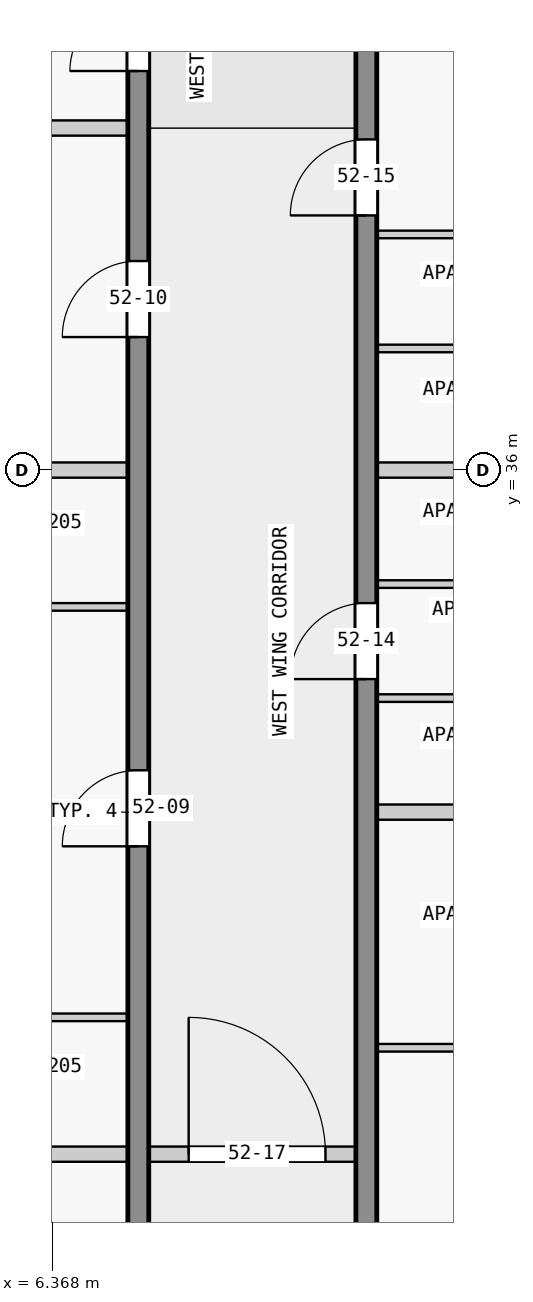
"""IFC4 building model, lengths in metres.
Left out: names, types, materials, properties, quantities, classifications, styles, units other than length and angle.
Written with IfcOpenShell. Run it as: python <this file> out.ifc"""

import sys

from ifc_helpers import new_model, si_unit, direction, frame, frame_2d, origin, place, context, subcontext, project, spatial, rectangle, extrude, element, fill, save


model = new_model("IFC4")
c1 = context("Model", 3, precision=1e-05, world=origin(), true_north=direction((0.0, 1.0)))
c2 = subcontext(c1, "Body", "Model", "MODEL_VIEW")
j1 = project(units=[si_unit("LENGTHUNIT", "METRE"), si_unit("PLANEANGLEUNIT", "RADIAN")], contexts=[c1])
p1 = place(None, origin())
s1 = spatial("IfcSite", under=j1, at=p1, CompositionType="ELEMENT")
p2 = place(p1, origin())
s2 = spatial("IfcBuilding", under=s1, at=p2, CompositionType="ELEMENT")
p3 = place(p2, frame((0.0, 0.0, 201.4)))
s3 = spatial("IfcBuildingStorey", under=s2, at=p3, CompositionType="ELEMENT", Elevation=201.4)
p4 = place(p3, frame((7.5, 18.0, 0.0), z_axis=(0.0, 0.0, 1.0), x_axis=(0.0, 1.0, 0.0)))
e1 = element("IfcWall", 1, at=p4, inside=s3, PredefinedType="SHEAR", context=c2, shape_type="SweptSolid", body=[
    extrude(rectangle(XDim=27.0, YDim=0.275, at=frame_2d((13.5, 0.0))), origin(), (0.0, 0.0, 1.0), 3.25),
])
p5 = place(p4, frame((1.75, 0.0, 0.0)))
e2 = element("IfcOpeningElement", 2, at=p5, cuts=e1, PredefinedType="OPENING", context=c2, shape_type="SweptSolid", body=[
    extrude(rectangle(XDim=1.0, YDim=2.1, at=frame_2d((0.5, 1.05))), frame((0.0, 0.147, 0.0), z_axis=(0.0, -1.0, 0.0), x_axis=(1.0, 0.0, 0.0)), (0.0, 0.0, 1.0), 0.295),
])
p6 = place(p4, frame((5.85, 0.0, 0.0)))
e3 = element("IfcOpeningElement", 3, at=p6, cuts=e1, PredefinedType="OPENING", context=c2, shape_type="SweptSolid", body=[
    extrude(rectangle(XDim=1.8, YDim=2.1, at=frame_2d((0.9, 1.05))), frame((0.0, 0.147, 0.0), z_axis=(0.0, -1.0, 0.0), x_axis=(1.0, 0.0, 0.0)), (0.0, 0.0, 1.0), 0.295),
])
p7 = place(p4, frame((13.05, 0.0, 0.0)))
e4 = element("IfcOpeningElement", 4, at=p7, cuts=e1, PredefinedType="OPENING", context=c2, shape_type="SweptSolid", body=[
    extrude(rectangle(XDim=1.0, YDim=2.1, at=frame_2d((0.5, 1.05))), frame((0.0, 0.147, 0.0), z_axis=(0.0, -1.0, 0.0), x_axis=(1.0, 0.0, 0.0)), (0.0, 0.0, 1.0), 0.295),
])
p8 = place(p4, frame((19.75, 0.0, 0.0)))
e5 = element("IfcOpeningElement", 5, at=p8, cuts=e1, PredefinedType="OPENING", context=c2, shape_type="SweptSolid", body=[
    extrude(rectangle(XDim=1.0, YDim=2.1, at=frame_2d((0.5, 1.05))), frame((0.0, 0.147, 0.0), z_axis=(0.0, -1.0, 0.0), x_axis=(1.0, 0.0, 0.0)), (0.0, 0.0, 1.0), 0.295),
])
p9 = place(p4, frame((23.25, 0.0, 0.0)))
e6 = element("IfcOpeningElement", 6, at=p9, cuts=e1, PredefinedType="OPENING", context=c2, shape_type="SweptSolid", body=[
    extrude(rectangle(XDim=0.9, YDim=2.1, at=frame_2d((0.45, 1.05))), frame((0.0, 0.147, 0.0), z_axis=(0.0, -1.0, 0.0), x_axis=(1.0, 0.0, 0.0)), (0.0, 0.0, 1.0), 0.295),
])
p10 = place(p4, frame((25.45, 0.0, 0.0)))
e7 = element("IfcOpeningElement", 7, at=p10, cuts=e1, PredefinedType="OPENING", context=c2, shape_type="SweptSolid", body=[
    extrude(rectangle(XDim=1.0, YDim=2.1, at=frame_2d((0.5, 1.05))), frame((0.0, 0.147, 0.0), z_axis=(0.0, -1.0, 0.0), x_axis=(1.0, 0.0, 0.0)), (0.0, 0.0, 1.0), 0.295),
])
p11 = place(p3, frame((10.5, 18.0, 0.0), z_axis=(0.0, 0.0, 1.0), x_axis=(0.0, 1.0, 0.0)))
e8 = element("IfcWall", 8, at=p11, inside=s3, PredefinedType="SHEAR", context=c2, shape_type="SweptSolid", body=[
    extrude(rectangle(XDim=27.0, YDim=0.275, at=frame_2d((13.5, 0.0))), origin(), (0.0, 0.0, 1.0), 3.25),
])
p12 = place(p11, frame((4.85, 0.0, 0.0)))
e9 = element("IfcOpeningElement", 9, at=p12, cuts=e8, PredefinedType="OPENING", context=c2, shape_type="SweptSolid", body=[
    extrude(rectangle(XDim=1.0, YDim=2.1, at=frame_2d((0.5, 1.05))), frame((0.0, 0.147, 0.0), z_axis=(0.0, -1.0, 0.0), x_axis=(1.0, 0.0, 0.0)), (0.0, 0.0, 1.0), 0.295),
])
p13 = place(p11, frame((15.25, 0.0, 0.0)))
e10 = element("IfcOpeningElement", 10, at=p13, cuts=e8, PredefinedType="OPENING", context=c2, shape_type="SweptSolid", body=[
    extrude(rectangle(XDim=1.0, YDim=2.1, at=frame_2d((0.5, 1.05))), frame((0.0, 0.147, 0.0), z_axis=(0.0, -1.0, 0.0), x_axis=(1.0, 0.0, 0.0)), (0.0, 0.0, 1.0), 0.295),
])
p14 = place(p11, frame((21.35, 0.0, 0.0)))
e11 = element("IfcOpeningElement", 11, at=p14, cuts=e8, PredefinedType="OPENING", context=c2, shape_type="SweptSolid", body=[
    extrude(rectangle(XDim=1.0, YDim=2.1, at=frame_2d((0.5, 1.05))), frame((0.0, 0.147, 0.0), z_axis=(0.0, -1.0, 0.0), x_axis=(1.0, 0.0, 0.0)), (0.0, 0.0, 1.0), 0.295),
])
p15 = place(p3, frame((7.363, 27.0, 0.0), z_axis=(0.0, 0.0, 1.0), x_axis=(-1.0, 0.0, 0.0)))
e12 = element("IfcWall", 12, at=p15, inside=s3, PredefinedType="PARTITIONING", context=c2, shape_type="SweptSolid", body=[
    extrude(rectangle(XDim=7.443, YDim=0.2, at=frame_2d((3.721, 0.0))), origin(), (0.0, 0.0, 1.0), 3.25),
])
p16 = place(p3, frame((10.637, 28.4, 0.0), z_axis=(0.0, 0.0, 1.0), x_axis=(1.0, 0.0, 0.0)))
e13 = element("IfcWall", 13, at=p16, inside=s3, PredefinedType="PARTITIONING", context=c2, shape_type="SweptSolid", body=[
    extrude(rectangle(XDim=3.35, YDim=0.1, at=frame_2d((1.675, 0.0))), origin(), (0.0, 0.0, 1.0), 3.25),
])
p17 = place(p16, frame((1.25, 0.0, 0.0)))
e14 = element("IfcOpeningElement", 14, at=p17, cuts=e13, PredefinedType="OPENING", context=c2, shape_type="SweptSolid", body=[
    extrude(rectangle(XDim=0.9, YDim=2.1, at=frame_2d((0.45, 1.05))), frame((0.0, 0.06, 0.0), z_axis=(0.0, -1.0, 0.0), x_axis=(1.0, 0.0, 0.0)), (0.0, 0.0, 1.0), 0.12),
])
p18 = place(p3, frame((7.363, 28.8, 0.0), z_axis=(0.0, 0.0, 1.0), x_axis=(-1.0, 0.0, 0.0)))
e15 = element("IfcWall", 15, at=p18, inside=s3, PredefinedType="PARTITIONING", context=c2, shape_type="SweptSolid", body=[
    extrude(rectangle(XDim=3.4, YDim=0.1, at=frame_2d((1.7, 0.0))), origin(), (0.0, 0.0, 1.0), 3.25),
])
p19 = place(p18, frame((1.25, 0.0, 0.0)))
e16 = element("IfcOpeningElement", 16, at=p19, cuts=e15, PredefinedType="OPENING", context=c2, shape_type="SweptSolid", body=[
    extrude(rectangle(XDim=0.9, YDim=2.1, at=frame_2d((0.45, 1.05))), frame((0.0, 0.06, 0.0), z_axis=(0.0, -1.0, 0.0), x_axis=(1.0, 0.0, 0.0)), (0.0, 0.0, 1.0), 0.12),
])
p20 = place(p3, frame((17.85, 31.5, 0.0), z_axis=(0.0, 0.0, 1.0), x_axis=(-1.0, 0.0, 0.0)))
e17 = element("IfcWall", 17, at=p20, inside=s3, PredefinedType="PARTITIONING", context=c2, shape_type="SweptSolid", body=[
    extrude(rectangle(XDim=7.213, YDim=0.2, at=frame_2d((3.606, 0.0))), origin(), (0.0, 0.0, 1.0), 3.25),
])
p21 = place(p3, frame((13.988, 33.0, 0.0), z_axis=(0.0, 0.0, 1.0), x_axis=(-1.0, 0.0, 0.0)))
e18 = element("IfcWall", 18, at=p21, inside=s3, PredefinedType="PARTITIONING", context=c2, shape_type="SweptSolid", body=[
    extrude(rectangle(XDim=3.35, YDim=0.1, at=frame_2d((1.675, 0.0))), origin(), (0.0, 0.0, 1.0), 3.25),
])
p22 = place(p21, frame((1.25, 0.0, 0.0)))
e19 = element("IfcOpeningElement", 19, at=p22, cuts=e18, PredefinedType="OPENING", context=c2, shape_type="SweptSolid", body=[
    extrude(rectangle(XDim=0.9, YDim=2.1, at=frame_2d((0.45, 1.05))), frame((0.0, 0.06, 0.0), z_axis=(0.0, -1.0, 0.0), x_axis=(1.0, 0.0, 0.0)), (0.0, 0.0, 1.0), 0.12),
])
p23 = place(p3, frame((3.962, 34.2, 0.0), z_axis=(0.0, 0.0, 1.0), x_axis=(1.0, 0.0, 0.0)))
e20 = element("IfcWall", 20, at=p23, inside=s3, PredefinedType="PARTITIONING", context=c2, shape_type="SweptSolid", body=[
    extrude(rectangle(XDim=3.4, YDim=0.1, at=frame_2d((1.7, 0.0))), origin(), (0.0, 0.0, 1.0), 3.25),
])
p24 = place(p23, frame((1.25, 0.0, 0.0)))
e21 = element("IfcOpeningElement", 21, at=p24, cuts=e20, PredefinedType="OPENING", context=c2, shape_type="SweptSolid", body=[
    extrude(rectangle(XDim=0.9, YDim=2.1, at=frame_2d((0.45, 1.05))), frame((0.0, 0.06, 0.0), z_axis=(0.0, -1.0, 0.0), x_axis=(1.0, 0.0, 0.0)), (0.0, 0.0, 1.0), 0.12),
])
p25 = place(p3, frame((10.637, 34.5, 0.0), z_axis=(0.0, 0.0, 1.0), x_axis=(1.0, 0.0, 0.0)))
e22 = element("IfcWall", 22, at=p25, inside=s3, PredefinedType="PARTITIONING", context=c2, shape_type="SweptSolid", body=[
    extrude(rectangle(XDim=3.35, YDim=0.1, at=frame_2d((1.675, 0.0))), origin(), (0.0, 0.0, 1.0), 3.25),
])
p26 = place(p25, frame((1.25, 0.0, 0.0)))
e23 = element("IfcOpeningElement", 23, at=p26, cuts=e22, PredefinedType="OPENING", context=c2, shape_type="SweptSolid", body=[
    extrude(rectangle(XDim=0.9, YDim=2.1, at=frame_2d((0.45, 1.05))), frame((0.0, 0.06, 0.0), z_axis=(0.0, -1.0, 0.0), x_axis=(1.0, 0.0, 0.0)), (0.0, 0.0, 1.0), 0.12),
])
for number, where, z_axis, x_axis in (
    (24, (7.363, 36.0, 0.0), (0.0, 0.0, 1.0), (-1.0, 0.0, 0.0)),
    (25, (14.038, 36.0, 0.0), (0.0, 0.0, 1.0), (-1.0, 0.0, 0.0)),
):
    element("IfcWall", number, at=place(p3, frame(where, z_axis=z_axis, x_axis=x_axis)), inside=s3, PredefinedType="PARTITIONING", context=c2, shape_type="SweptSolid", body=[
        extrude(rectangle(XDim=3.4, YDim=0.2, at=frame_2d((1.7, 0.0))), origin(), (0.0, 0.0, 1.0), 3.25),
    ])
p27 = place(p3, frame((13.988, 37.6, 0.0), z_axis=(0.0, 0.0, 1.0), x_axis=(-1.0, 0.0, 0.0)))
e26 = element("IfcWall", 26, at=p27, inside=s3, PredefinedType="PARTITIONING", context=c2, shape_type="SweptSolid", body=[
    extrude(rectangle(XDim=3.35, YDim=0.1, at=frame_2d((1.675, 0.0))), origin(), (0.0, 0.0, 1.0), 3.25),
])
p28 = place(p3, frame((13.988, 39.1, 0.0), z_axis=(0.0, 0.0, 1.0), x_axis=(-1.0, 0.0, 0.0)))
e27 = element("IfcWall", 27, at=p28, inside=s3, PredefinedType="PARTITIONING", context=c2, shape_type="SweptSolid", body=[
    extrude(rectangle(XDim=3.35, YDim=0.1, at=frame_2d((1.675, 0.0))), origin(), (0.0, 0.0, 1.0), 3.25),
])
p29 = place(p28, frame((1.25, 0.0, 0.0)))
e28 = element("IfcOpeningElement", 28, at=p29, cuts=e27, PredefinedType="OPENING", context=c2, shape_type="SweptSolid", body=[
    extrude(rectangle(XDim=0.9, YDim=2.1, at=frame_2d((0.45, 1.05))), frame((0.0, 0.06, 0.0), z_axis=(0.0, -1.0, 0.0), x_axis=(1.0, 0.0, 0.0)), (0.0, 0.0, 1.0), 0.12),
])
p30 = place(p3, frame((7.363, 40.5, 0.0), z_axis=(0.0, 0.0, 1.0), x_axis=(-1.0, 0.0, 0.0)))
e29 = element("IfcWall", 29, at=p30, inside=s3, PredefinedType="PARTITIONING", context=c2, shape_type="SweptSolid", body=[
    extrude(rectangle(XDim=7.443, YDim=0.2, at=frame_2d((3.721, 0.0))), origin(), (0.0, 0.0, 1.0), 3.25),
])
p31 = place(p3, frame((7.462, 27.0, 0.0), z_axis=(0.0, 0.0, 1.0), x_axis=(1.0, 0.0, 0.0)))
e30 = element("IfcWall", 30, at=p31, inside=s3, PredefinedType="PARTITIONING", context=c2, shape_type="SweptSolid", body=[
    extrude(rectangle(XDim=3.175, YDim=0.2, at=frame_2d((1.587, 0.0))), origin(), (0.0, 0.0, 1.0), 3.25),
])
p32 = place(p31, frame((0.7, 0.0, 0.0)))
e31 = element("IfcOpeningElement", 31, at=p32, cuts=e30, PredefinedType="OPENING", context=c2, shape_type="SweptSolid", body=[
    extrude(rectangle(XDim=1.8, YDim=2.1, at=frame_2d((0.9, 1.05))), frame((0.0, 0.11, 0.0), z_axis=(0.0, -1.0, 0.0), x_axis=(1.0, 0.0, 0.0)), (0.0, 0.0, 1.0), 0.22),
])
p33 = place(p7, origin())
e32 = element("IfcDoor", 32, at=p33, inside=s3, OperationType="SINGLE_SWING_RIGHT", PredefinedType="DOOR", context=c2, shape_type="SweptSolid", body=[
    extrude(rectangle(XDim=1.0, YDim=2.1, at=frame_2d((0.5, 1.05))), frame((0.0, 0.025, 0.0), z_axis=(0.0, -1.0, 0.0), x_axis=(1.0, 0.0, 0.0)), (0.0, 0.0, 1.0), 0.05),
])
fill(e4, e32)
p34 = place(p8, origin())
e33 = element("IfcDoor", 33, at=p34, inside=s3, OperationType="SINGLE_SWING_RIGHT", PredefinedType="DOOR", context=c2, shape_type="SweptSolid", body=[
    extrude(rectangle(XDim=1.0, YDim=2.1, at=frame_2d((0.5, 1.05))), frame((0.0, 0.025, 0.0), z_axis=(0.0, -1.0, 0.0), x_axis=(1.0, 0.0, 0.0)), (0.0, 0.0, 1.0), 0.05),
])
fill(e5, e33)
p35 = place(p9, origin())
e34 = element("IfcDoor", 34, at=p35, inside=s3, OperationType="SINGLE_SWING_RIGHT", PredefinedType="DOOR", context=c2, shape_type="SweptSolid", body=[
    extrude(rectangle(XDim=0.9, YDim=2.1, at=frame_2d((0.45, 1.05))), frame((0.0, 0.025, 0.0), z_axis=(0.0, -1.0, 0.0), x_axis=(1.0, 0.0, 0.0)), (0.0, 0.0, 1.0), 0.05),
])
fill(e6, e34)
p36 = place(p13, origin())
e35 = element("IfcDoor", 35, at=p36, inside=s3, OperationType="SINGLE_SWING_RIGHT", PredefinedType="DOOR", context=c2, shape_type="SweptSolid", body=[
    extrude(rectangle(XDim=1.0, YDim=2.1, at=frame_2d((0.5, 1.05))), frame((0.0, 0.025, 0.0), z_axis=(0.0, -1.0, 0.0), x_axis=(1.0, 0.0, 0.0)), (0.0, 0.0, 1.0), 0.05),
])
fill(e10, e35)
p37 = place(p14, origin())
e36 = element("IfcDoor", 36, at=p37, inside=s3, OperationType="SINGLE_SWING_RIGHT", PredefinedType="DOOR", context=c2, shape_type="SweptSolid", body=[
    extrude(rectangle(XDim=1.0, YDim=2.1, at=frame_2d((0.5, 1.05))), frame((0.0, 0.025, 0.0), z_axis=(0.0, -1.0, 0.0), x_axis=(1.0, 0.0, 0.0)), (0.0, 0.0, 1.0), 0.05),
])
fill(e11, e36)
p38 = place(p32, origin())
e37 = element("IfcDoor", 37, at=p38, inside=s3, OperationType="SINGLE_SWING_RIGHT", PredefinedType="DOOR", context=c2, shape_type="SweptSolid", body=[
    extrude(rectangle(XDim=1.8, YDim=2.1, at=frame_2d((0.9, 1.05))), frame((0.0, 0.025, 0.0), z_axis=(0.0, -1.0, 0.0), x_axis=(1.0, 0.0, 0.0)), (0.0, 0.0, 1.0), 0.05),
])
fill(e31, e37)
save(model, sys.argv[1])
